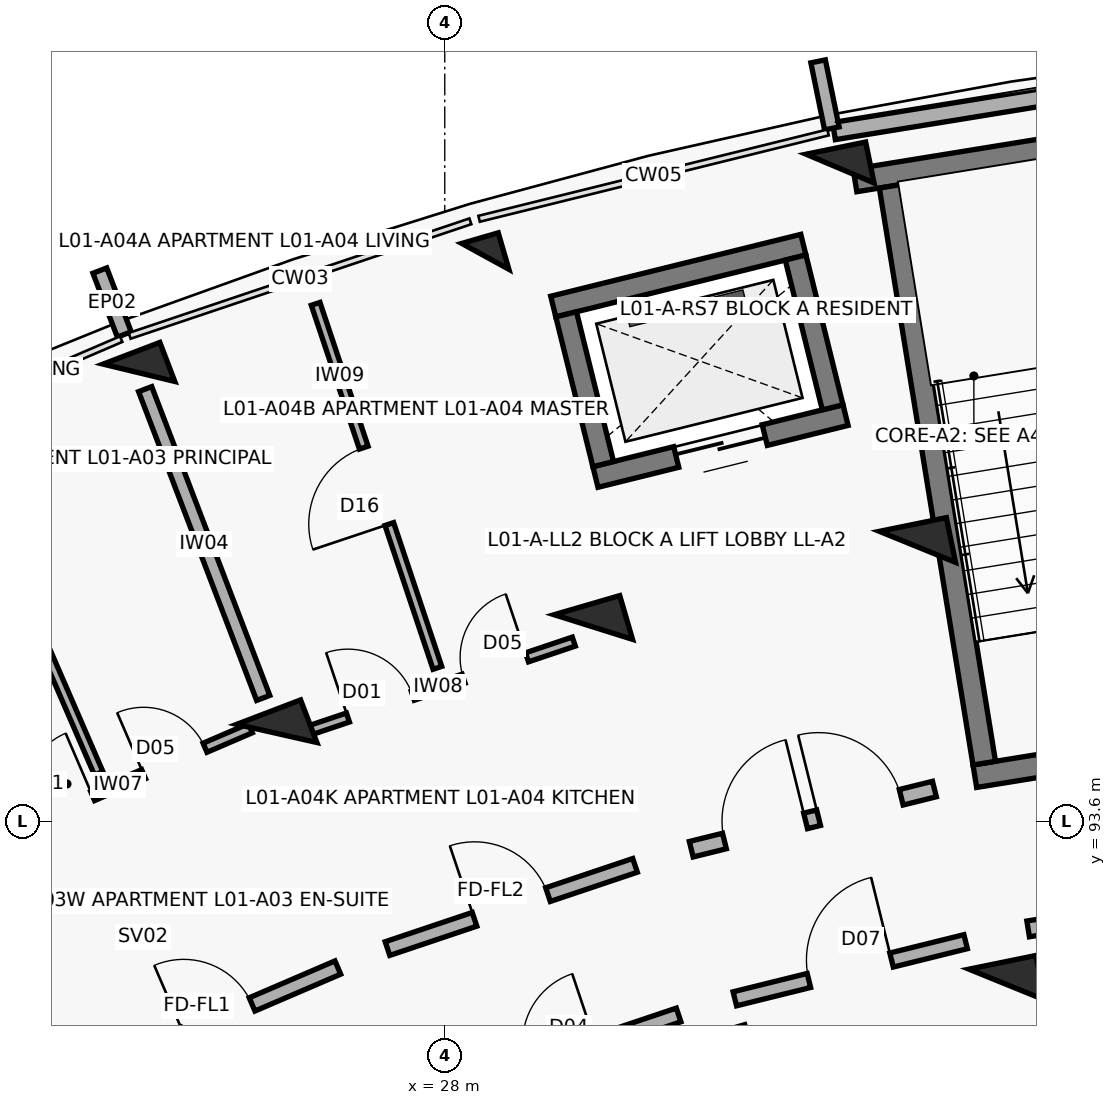
"""IFC4 building model, lengths in metres.
Left out: names, types, materials, properties, quantities, classifications, styles, units other than length and angle.
Written with IfcOpenShell. Run it as: python <this file> out.ifc"""

import sys

from ifc_helpers import new_model, si_unit, direction, frame, frame_2d, origin, origin_2d, place, context, subcontext, project, spatial, rectangle, extrude, element, fill, save


model = new_model("IFC4")
c1 = context("Model", 3, precision=1e-05, world=origin(), true_north=direction((0.0, 1.0)))
c2 = subcontext(c1, "Body", "Model", "MODEL_VIEW")
j1 = project(units=[si_unit("LENGTHUNIT", "METRE"), si_unit("PLANEANGLEUNIT", "RADIAN")], contexts=[c1])
p1 = place(None, origin())
s1 = spatial("IfcSite", under=j1, at=p1, CompositionType="ELEMENT")
p2 = place(p1, origin())
s2 = spatial("IfcBuilding", under=s1, at=p2, CompositionType="ELEMENT")
p3 = place(p2, frame((0.0, 0.0, 4.5)))
s3 = spatial("IfcBuildingStorey", under=s2, at=p3, CompositionType="ELEMENT", Elevation=4.5)
p4 = place(p3, frame((25.79, 94.753, 0.0), z_axis=(0.0, 0.0, 1.0), x_axis=(-0.357064076459, 0.934079892355, 0.0)))
e1 = element("IfcColumn", 1, at=p4, inside=s3, PredefinedType="COLUMN", context=c2, shape_type="SweptSolid", body=[
    extrude(rectangle(XDim=0.6, YDim=0.9, at=origin_2d()), origin(), (0.0, 0.0, 1.0), 3.6),
])
p5 = place(p3, frame((23.976, 99.499, 0.0), z_axis=(0.0, 0.0, 1.0), x_axis=(-0.357064076459, 0.934079892355, 0.0)))
e2 = element("IfcColumn", 2, at=p5, inside=s3, PredefinedType="COLUMN", context=c2, shape_type="SweptSolid", body=[
    extrude(rectangle(XDim=0.55, YDim=0.8, at=origin_2d()), origin(), (0.0, 0.0, 1.0), 3.6),
])
p6 = place(p3, frame((29.954, 96.153, 0.0), z_axis=(0.0, 0.0, 1.0), x_axis=(-0.27966144946, 0.96009867914, 0.0)))
e3 = element("IfcColumn", 3, at=p6, inside=s3, PredefinedType="COLUMN", context=c2, shape_type="SweptSolid", body=[
    extrude(rectangle(XDim=0.6, YDim=0.9, at=origin_2d()), origin(), (0.0, 0.0, 1.0), 3.6),
])
p7 = place(p3, frame((28.533, 101.031, 0.0), z_axis=(0.0, 0.0, 1.0), x_axis=(-0.27966144946, 0.96009867914, 0.0)))
e4 = element("IfcColumn", 4, at=p7, inside=s3, PredefinedType="COLUMN", context=c2, shape_type="SweptSolid", body=[
    extrude(rectangle(XDim=0.5, YDim=0.5, at=origin_2d()), origin(), (0.0, 0.0, 1.0), 3.6),
])
for number, where, z_axis, x_axis in (
    (5, (35.397, 91.448, 0.0), (0.0, 0.0, 1.0), (-0.2, 0.98, 0.0)),
    (6, (34.219, 97.209, 0.0), (0.0, 0.0, 1.0), (-0.2, 0.98, 0.0)),
):
    element("IfcColumn", number, at=place(p3, frame(where, z_axis=z_axis, x_axis=x_axis)), inside=s3, PredefinedType="COLUMN", context=c2, shape_type="SweptSolid", body=[
        extrude(rectangle(XDim=0.6, YDim=0.9, at=origin_2d()), origin(), (0.0, 0.0, 1.0), 3.6),
    ])
p8 = place(p3, frame((33.201, 102.186, 0.0), z_axis=(0.0, 0.0, 1.0), x_axis=(-0.200393999665, 0.979715389742, 0.0)))
e7 = element("IfcColumn", 7, at=p8, inside=s3, PredefinedType="COLUMN", context=c2, shape_type="SweptSolid", body=[
    extrude(rectangle(XDim=0.55, YDim=0.8, at=origin_2d()), origin(), (0.0, 0.0, 1.0), 3.6),
])
p9 = place(p3, frame((23.783, 100.003, 0.0), z_axis=(0.0, 0.0, 1.0), x_axis=(-0.356942580168, 0.934126326823, 0.0)))
e8 = element("IfcWall", 8, at=p9, inside=s3, PredefinedType="PARAPET", context=c2, shape_type="SweptSolid", body=[
    extrude(rectangle(XDim=0.9, YDim=0.195, at=frame_2d((0.45, 0.0))), origin(), (0.0, 0.0, 1.0), 2.6),
])
p10 = place(p3, frame((33.12, 102.679, 0.0), z_axis=(0.0, 0.0, 1.0), x_axis=(0.987080750493, 0.160223568819, 0.0)))
e9 = element("IfcWall", 9, at=p10, inside=s3, PredefinedType="SOLIDWALL", context=c2, shape_type="SweptSolid", body=[
    extrude(rectangle(XDim=4.809, YDim=0.228, at=frame_2d((2.404, 0.0))), origin(), (0.0, 0.0, 1.0), 2.6),
])
p11 = place(p3, frame((33.093, 102.715, 0.0), z_axis=(0.0, 0.0, 1.0), x_axis=(-0.200183211319, 0.979758481416, 0.0)))
e10 = element("IfcWall", 10, at=p11, inside=s3, PredefinedType="PARAPET", context=c2, shape_type="SweptSolid", body=[
    extrude(rectangle(XDim=0.9, YDim=0.195, at=frame_2d((0.45, 0.0))), origin(), (0.0, 0.0, 1.0), 2.6),
])
p12 = place(p3, frame((38.794, 94.811, 0.0), z_axis=(0.0, 0.0, 1.0), x_axis=(-0.987077443397, -0.160243941341, 0.0)))
e11 = element("IfcWall", 11, at=p12, inside=s3, PredefinedType="SHEAR", context=c2, shape_type="SweptSolid", body=[
    extrude(rectangle(XDim=3.87, YDim=0.3, at=frame_2d((1.935, 0.0))), origin(), (0.0, 0.0, 1.0), 3.6),
])
p13 = place(p12, frame((1.435, 0.0, 0.0)))
e12 = element("IfcOpeningElement", 12, at=p13, cuts=e11, PredefinedType="OPENING", context=c2, shape_type="SweptSolid", body=[
    extrude(rectangle(XDim=1.0, YDim=2.15, at=frame_2d((0.5, 1.075))), frame((0.0, 0.16, 0.0), z_axis=(0.0, -1.0, 0.0), x_axis=(1.0, 0.0, 0.0)), (0.0, 0.0, 1.0), 0.32),
])
p14 = place(p3, frame((37.81, 102.745, 0.0), z_axis=(0.0, 0.0, 1.0), x_axis=(-0.987084710126, -0.160199173019, 0.0)))
e13 = element("IfcWall", 13, at=p14, inside=s3, PredefinedType="SHEAR", context=c2, shape_type="SweptSolid", body=[
    extrude(rectangle(XDim=4.47, YDim=0.3, at=frame_2d((2.235, 0.0))), origin(), (0.0, 0.0, 1.0), 3.6),
])
p15 = place(p3, frame((35.098, 94.363, 0.0), z_axis=(0.0, 0.0, 1.0), x_axis=(-0.160227496777, 0.987080112897, 0.0)))
e14 = element("IfcWall", 14, at=p15, inside=s3, PredefinedType="SHEAR", context=c2, shape_type="SweptSolid", body=[
    extrude(rectangle(XDim=7.69, YDim=0.3, at=frame_2d((3.845, 0.0))), origin(), (0.0, 0.0, 1.0), 3.6),
])
p16 = place(p3, frame((33.273, 98.942, 0.0), z_axis=(0.0, 0.0, 1.0), x_axis=(-0.970707542441, -0.240264160972, 0.0)))
e15 = element("IfcWall", 15, at=p16, inside=s3, PredefinedType="SHEAR", context=c2, shape_type="SweptSolid", body=[
    extrude(rectangle(XDim=3.39, YDim=0.28, at=frame_2d((1.695, 0.0))), origin(), (0.0, 0.0, 1.0), 3.6),
])
p17 = place(p16, frame((1.095, 0.0, 0.0)))
e16 = element("IfcOpeningElement", 16, at=p17, cuts=e15, PredefinedType="OPENING", context=c2, shape_type="SweptSolid", body=[
    extrude(rectangle(XDim=1.2, YDim=2.15, at=frame_2d((0.6, 1.075))), frame((0.0, 0.15, 0.0), z_axis=(0.0, -1.0, 0.0), x_axis=(1.0, 0.0, 0.0)), (0.0, 0.0, 1.0), 0.3),
])
p18 = place(p3, frame((32.718, 101.185, 0.0), z_axis=(0.0, 0.0, 1.0), x_axis=(-0.970711699588, -0.240247364777, 0.0)))
e17 = element("IfcWall", 17, at=p18, inside=s3, PredefinedType="SHEAR", context=c2, shape_type="SweptSolid", body=[
    extrude(rectangle(XDim=3.39, YDim=0.28, at=frame_2d((1.695, 0.0))), origin(), (0.0, 0.0, 1.0), 3.6),
])
p19 = place(p3, frame((33.104, 99.044, 0.0), z_axis=(0.0, 0.0, 1.0), x_axis=(-0.240186044774, 0.970726873995, 0.0)))
e18 = element("IfcWall", 18, at=p19, inside=s3, PredefinedType="SHEAR", context=c2, shape_type="SweptSolid", body=[
    extrude(rectangle(XDim=2.03, YDim=0.28, at=frame_2d((1.015, 0.0))), origin(), (0.0, 0.0, 1.0), 3.6),
])
p20 = place(p3, frame((30.085, 98.297, 0.0), z_axis=(0.0, 0.0, 1.0), x_axis=(-0.2402993748, 0.970698825832, 0.0)))
e19 = element("IfcWall", 19, at=p20, inside=s3, PredefinedType="SHEAR", context=c2, shape_type="SweptSolid", body=[
    extrude(rectangle(XDim=2.03, YDim=0.28, at=frame_2d((1.015, 0.0))), origin(), (0.0, 0.0, 1.0), 3.6),
])
p21 = place(p3, frame((23.437, 90.316, 0.0), z_axis=(0.0, 0.0, 1.0), x_axis=(0.918718172399, 0.394913813008, 0.0)))
e20 = element("IfcWall", 20, at=p21, inside=s3, PredefinedType="SOLIDWALL", context=c2, shape_type="SweptSolid", body=[
    extrude(rectangle(XDim=3.436, YDim=0.19, at=frame_2d((1.718, 0.0))), origin(), (0.0, 0.0, 1.0), 2.58),
])
p22 = place(p21, frame((1.228, 0.0, 0.0)))
e21 = element("IfcOpeningElement", 21, at=p22, cuts=e20, PredefinedType="OPENING", context=c2, shape_type="SweptSolid", body=[
    extrude(rectangle(XDim=0.98, YDim=2.15, at=frame_2d((0.49, 1.075))), frame((0.0, 0.105, 0.0), z_axis=(0.0, -1.0, 0.0), x_axis=(1.0, 0.0, 0.0)), (0.0, 0.0, 1.0), 0.21),
])
p23 = place(p3, frame((21.943, 93.317, 0.0), z_axis=(0.0, 0.0, 1.0), x_axis=(0.918726854017, 0.394893615684, 0.0)))
e22 = element("IfcWall", 22, at=p23, inside=s3, PredefinedType="PARTITIONING", context=c2, shape_type="SweptSolid", body=[
    extrude(rectangle(XDim=3.81, YDim=0.13, at=frame_2d((1.905, 0.0))), origin(), (0.0, 0.0, 1.0), 2.58),
])
p24 = place(p23, frame((0.65, 0.0, 0.0)))
e23 = element("IfcOpeningElement", 23, at=p24, cuts=e22, PredefinedType="OPENING", context=c2, shape_type="SweptSolid", body=[
    extrude(rectangle(XDim=0.9, YDim=2.1, at=frame_2d((0.45, 1.05))), frame((0.0, 0.075, 0.0), z_axis=(0.0, -1.0, 0.0), x_axis=(1.0, 0.0, 0.0)), (0.0, 0.0, 1.0), 0.15),
])
p25 = place(p23, frame((2.28, 0.0, 0.0)))
e24 = element("IfcOpeningElement", 24, at=p25, cuts=e22, PredefinedType="OPENING", context=c2, shape_type="SweptSolid", body=[
    extrude(rectangle(XDim=0.88, YDim=2.1, at=frame_2d((0.44, 1.05))), frame((0.0, 0.075, 0.0), z_axis=(0.0, -1.0, 0.0), x_axis=(1.0, 0.0, 0.0)), (0.0, 0.0, 1.0), 0.15),
])
p26 = place(p3, frame((23.446, 94.23, 0.0), z_axis=(0.0, 0.0, 1.0), x_axis=(-0.3976752315, 0.917526244993, 0.0)))
e25 = element("IfcWall", 25, at=p26, inside=s3, PredefinedType="PARTITIONING", context=c2, shape_type="SweptSolid", body=[
    extrude(rectangle(XDim=4.75, YDim=0.12, at=frame_2d((2.375, 0.0))), origin(), (0.0, 0.0, 1.0), 2.58),
])
p27 = place(p26, frame((1.87, 0.0, 0.0)))
e26 = element("IfcOpeningElement", 26, at=p27, cuts=e25, PredefinedType="OPENING", context=c2, shape_type="SweptSolid", body=[
    extrude(rectangle(XDim=1.01, YDim=2.1, at=frame_2d((0.505, 1.05))), frame((0.0, 0.07, 0.0), z_axis=(0.0, -1.0, 0.0), x_axis=(1.0, 0.0, 0.0)), (0.0, 0.0, 1.0), 0.14),
])
p28 = place(p3, frame((27.247, 91.923, 0.0), z_axis=(0.0, 0.0, 1.0), x_axis=(0.947863007629, 0.318678080151, 0.0)))
e27 = element("IfcWall", 27, at=p28, inside=s3, PredefinedType="SOLIDWALL", context=c2, shape_type="SweptSolid", body=[
    extrude(rectangle(XDim=3.436, YDim=0.19, at=frame_2d((1.718, 0.0))), origin(), (0.0, 0.0, 1.0), 2.58),
])
p29 = place(p28, frame((1.208, 0.0, 0.0)))
e28 = element("IfcOpeningElement", 28, at=p29, cuts=e27, PredefinedType="OPENING", context=c2, shape_type="SweptSolid", body=[
    extrude(rectangle(XDim=1.02, YDim=2.15, at=frame_2d((0.51, 1.075))), frame((0.0, 0.105, 0.0), z_axis=(0.0, -1.0, 0.0), x_axis=(1.0, 0.0, 0.0)), (0.0, 0.0, 1.0), 0.21),
])
p30 = place(p3, frame((27.979, 90.008, 0.0), z_axis=(0.0, 0.0, 1.0), x_axis=(0.94787351033, 0.318646839643, 0.0)))
e29 = element("IfcWall", 29, at=p30, inside=s3, PredefinedType="SOLIDWALL", context=c2, shape_type="SweptSolid", body=[
    extrude(rectangle(XDim=3.269, YDim=0.19, at=frame_2d((1.634, 0.0))), origin(), (0.0, 0.0, 1.0), 2.58),
])
p31 = place(p30, frame((1.154, 0.0, 0.0)))
e30 = element("IfcOpeningElement", 30, at=p31, cuts=e29, PredefinedType="OPENING", context=c2, shape_type="SweptSolid", body=[
    extrude(rectangle(XDim=0.96, YDim=2.1, at=frame_2d((0.48, 1.05))), frame((0.0, 0.105, 0.0), z_axis=(0.0, -1.0, 0.0), x_axis=(1.0, 0.0, 0.0)), (0.0, 0.0, 1.0), 0.21),
])
p32 = place(p3, frame((26.11, 94.756, 0.0), z_axis=(0.0, 0.0, 1.0), x_axis=(0.947873924847, 0.318645606584, 0.0)))
e31 = element("IfcWall", 31, at=p32, inside=s3, PredefinedType="PARTITIONING", context=c2, shape_type="SweptSolid", body=[
    extrude(rectangle(XDim=3.785, YDim=0.125, at=frame_2d((1.893, 0.0))), origin(), (0.0, 0.0, 1.0), 2.58),
])
p33 = place(p32, frame((0.65, 0.0, 0.0)))
e32 = element("IfcOpeningElement", 32, at=p33, cuts=e31, PredefinedType="OPENING", context=c2, shape_type="SweptSolid", body=[
    extrude(rectangle(XDim=0.9, YDim=2.1, at=frame_2d((0.45, 1.05))), frame((0.0, 0.073, 0.0), z_axis=(0.0, -1.0, 0.0), x_axis=(1.0, 0.0, 0.0)), (0.0, 0.0, 1.0), 0.145),
])
p34 = place(p32, frame((2.255, 0.0, 0.0)))
e33 = element("IfcOpeningElement", 33, at=p34, cuts=e31, PredefinedType="OPENING", context=c2, shape_type="SweptSolid", body=[
    extrude(rectangle(XDim=0.88, YDim=2.1, at=frame_2d((0.44, 1.05))), frame((0.0, 0.073, 0.0), z_axis=(0.0, -1.0, 0.0), x_axis=(1.0, 0.0, 0.0)), (0.0, 0.0, 1.0), 0.145),
])
p35 = place(p3, frame((27.903, 95.616, 0.0), z_axis=(0.0, 0.0, 1.0), x_axis=(-0.31722829501, 0.948349201953, 0.0)))
e34 = element("IfcWall", 34, at=p35, inside=s3, PredefinedType="PARTITIONING", context=c2, shape_type="SweptSolid", body=[
    extrude(rectangle(XDim=5.05, YDim=0.12, at=frame_2d((2.525, 0.0))), origin(), (0.0, 0.0, 1.0), 2.58),
])
p36 = place(p35, frame((1.995, 0.0, 0.0)))
e35 = element("IfcOpeningElement", 35, at=p36, cuts=e34, PredefinedType="OPENING", context=c2, shape_type="SweptSolid", body=[
    extrude(rectangle(XDim=1.06, YDim=2.1, at=frame_2d((0.53, 1.05))), frame((0.0, 0.07, 0.0), z_axis=(0.0, -1.0, 0.0), x_axis=(1.0, 0.0, 0.0)), (0.0, 0.0, 1.0), 0.14),
])
p37 = place(p3, frame((25.611, 95.22, 0.0), z_axis=(0.0, 0.0, 1.0), x_axis=(-0.357064016205, 0.934079915388, 0.0)))
e36 = element("IfcWall", 36, at=p37, inside=s3, PredefinedType="SOLIDWALL", context=c2, shape_type="SweptSolid", body=[
    extrude(rectangle(XDim=4.35, YDim=0.185, at=frame_2d((2.175, 0.0))), origin(), (0.0, 0.0, 1.0), 2.58),
])
p38 = place(p3, frame((31.243, 93.23, 0.0), z_axis=(0.0, 0.0, 1.0), x_axis=(0.970719238682, 0.240216901263, 0.0)))
e37 = element("IfcWall", 37, at=p38, inside=s3, PredefinedType="SOLIDWALL", context=c2, shape_type="SweptSolid", body=[
    extrude(rectangle(XDim=3.296, YDim=0.21, at=frame_2d((1.648, 0.0))), origin(), (0.0, 0.0, 1.0), 2.58),
])
p39 = place(p38, frame((0.45, 0.0, 0.0)))
e38 = element("IfcOpeningElement", 38, at=p39, cuts=e37, PredefinedType="OPENING", context=c2, shape_type="SweptSolid", body=[
    extrude(rectangle(XDim=1.1, YDim=2.15, at=frame_2d((0.55, 1.075))), frame((0.0, 0.115, 0.0), z_axis=(0.0, -1.0, 0.0), x_axis=(1.0, 0.0, 0.0)), (0.0, 0.0, 1.0), 0.23),
])
p40 = place(p38, frame((1.726, 0.0, 0.0)))
e39 = element("IfcOpeningElement", 39, at=p40, cuts=e37, PredefinedType="OPENING", context=c2, shape_type="SweptSolid", body=[
    extrude(rectangle(XDim=1.12, YDim=2.15, at=frame_2d((0.56, 1.075))), frame((0.0, 0.115, 0.0), z_axis=(0.0, -1.0, 0.0), x_axis=(1.0, 0.0, 0.0)), (0.0, 0.0, 1.0), 0.23),
])
p41 = place(p3, frame((31.816, 91.262, 0.0), z_axis=(0.0, 0.0, 1.0), x_axis=(0.970727194092, 0.240184751078, 0.0)))
e40 = element("IfcWall", 40, at=p41, inside=s3, PredefinedType="SOLIDWALL", context=c2, shape_type="SweptSolid", body=[
    extrude(rectangle(XDim=3.129, YDim=0.19, at=frame_2d((1.564, 0.0))), origin(), (0.0, 0.0, 1.0), 2.58),
])
p42 = place(p41, frame((1.004, 0.0, 0.0)))
e41 = element("IfcOpeningElement", 41, at=p42, cuts=e40, PredefinedType="OPENING", context=c2, shape_type="SweptSolid", body=[
    extrude(rectangle(XDim=1.12, YDim=2.15, at=frame_2d((0.56, 1.075))), frame((0.0, 0.105, 0.0), z_axis=(0.0, -1.0, 0.0), x_axis=(1.0, 0.0, 0.0)), (0.0, 0.0, 1.0), 0.21),
])
p43 = place(p3, frame((35.676, 92.181, 0.0), z_axis=(0.0, 0.0, 1.0), x_axis=(0.98707079686, 0.160284877599, 0.0)))
e42 = element("IfcWall", 42, at=p43, inside=s3, PredefinedType="SOLIDWALL", context=c2, shape_type="SweptSolid", body=[
    extrude(rectangle(XDim=3.129, YDim=0.21, at=frame_2d((1.564, 0.0))), origin(), (0.0, 0.0, 1.0), 2.58),
])
p44 = place(p43, frame((1.014, 0.0, 0.0)))
e43 = element("IfcOpeningElement", 43, at=p44, cuts=e42, PredefinedType="OPENING", context=c2, shape_type="SweptSolid", body=[
    extrude(rectangle(XDim=1.1, YDim=2.15, at=frame_2d((0.55, 1.075))), frame((0.0, 0.115, 0.0), z_axis=(0.0, -1.0, 0.0), x_axis=(1.0, 0.0, 0.0)), (0.0, 0.0, 1.0), 0.23),
])
p45 = place(p17, origin())
e44 = element("IfcDoor", 44, at=p45, inside=s3, OperationType="DOUBLE_DOOR_SLIDING", PredefinedType="DOOR", context=c2, shape_type="SweptSolid", body=[
    extrude(rectangle(XDim=1.2, YDim=2.15, at=frame_2d((0.6, 1.075))), frame((0.0, 0.025, 0.0), z_axis=(0.0, -1.0, 0.0), x_axis=(1.0, 0.0, 0.0)), (0.0, 0.0, 1.0), 0.05),
])
fill(e16, e44)
p46 = place(p22, origin())
e45 = element("IfcDoor", 45, at=p46, inside=s3, OperationType="SINGLE_SWING_LEFT", PredefinedType="DOOR", context=c2, shape_type="SweptSolid", body=[
    extrude(rectangle(XDim=0.98, YDim=2.15, at=frame_2d((0.49, 1.075))), frame((0.0, 0.025, 0.0), z_axis=(0.0, -1.0, 0.0), x_axis=(1.0, 0.0, 0.0)), (0.0, 0.0, 1.0), 0.05),
])
fill(e21, e45)
p47 = place(p24, origin())
e46 = element("IfcDoor", 46, at=p47, inside=s3, OperationType="SINGLE_SWING_RIGHT", PredefinedType="DOOR", context=c2, shape_type="SweptSolid", body=[
    extrude(rectangle(XDim=0.9, YDim=2.1, at=frame_2d((0.45, 1.05))), frame((0.0, 0.025, 0.0), z_axis=(0.0, -1.0, 0.0), x_axis=(1.0, 0.0, 0.0)), (0.0, 0.0, 1.0), 0.05),
])
fill(e23, e46)
p48 = place(p25, origin())
e47 = element("IfcDoor", 47, at=p48, inside=s3, OperationType="SINGLE_SWING_LEFT", PredefinedType="DOOR", context=c2, shape_type="SweptSolid", body=[
    extrude(rectangle(XDim=0.88, YDim=2.1, at=frame_2d((0.44, 1.05))), frame((0.0, 0.025, 0.0), z_axis=(0.0, -1.0, 0.0), x_axis=(1.0, 0.0, 0.0)), (0.0, 0.0, 1.0), 0.05),
])
fill(e24, e47)
p49 = place(p29, origin())
e48 = element("IfcDoor", 48, at=p49, inside=s3, OperationType="SINGLE_SWING_LEFT", PredefinedType="DOOR", context=c2, shape_type="SweptSolid", body=[
    extrude(rectangle(XDim=1.02, YDim=2.15, at=frame_2d((0.51, 1.075))), frame((0.0, 0.025, 0.0), z_axis=(0.0, -1.0, 0.0), x_axis=(1.0, 0.0, 0.0)), (0.0, 0.0, 1.0), 0.05),
])
fill(e28, e48)
p50 = place(p33, origin())
e49 = element("IfcDoor", 49, at=p50, inside=s3, OperationType="SINGLE_SWING_LEFT", PredefinedType="DOOR", context=c2, shape_type="SweptSolid", body=[
    extrude(rectangle(XDim=0.9, YDim=2.1, at=frame_2d((0.45, 1.05))), frame((0.0, 0.025, 0.0), z_axis=(0.0, -1.0, 0.0), x_axis=(1.0, 0.0, 0.0)), (0.0, 0.0, 1.0), 0.05),
])
fill(e32, e49)
p51 = place(p34, origin())
e50 = element("IfcDoor", 50, at=p51, inside=s3, OperationType="SINGLE_SWING_RIGHT", PredefinedType="DOOR", context=c2, shape_type="SweptSolid", body=[
    extrude(rectangle(XDim=0.88, YDim=2.1, at=frame_2d((0.44, 1.05))), frame((0.0, 0.025, 0.0), z_axis=(0.0, -1.0, 0.0), x_axis=(1.0, 0.0, 0.0)), (0.0, 0.0, 1.0), 0.05),
])
fill(e33, e50)
p52 = place(p36, origin())
e51 = element("IfcDoor", 51, at=p52, inside=s3, OperationType="SINGLE_SWING_LEFT", PredefinedType="DOOR", context=c2, shape_type="SweptSolid", body=[
    extrude(rectangle(XDim=1.06, YDim=2.1, at=frame_2d((0.53, 1.05))), frame((0.0, 0.025, 0.0), z_axis=(0.0, -1.0, 0.0), x_axis=(1.0, 0.0, 0.0)), (0.0, 0.0, 1.0), 0.05),
])
fill(e35, e51)
p53 = place(p39, origin())
e52 = element("IfcDoor", 52, at=p53, inside=s3, OperationType="SINGLE_SWING_RIGHT", PredefinedType="DOOR", context=c2, shape_type="SweptSolid", body=[
    extrude(rectangle(XDim=1.1, YDim=2.15, at=frame_2d((0.55, 1.075))), frame((0.0, 0.025, 0.0), z_axis=(0.0, -1.0, 0.0), x_axis=(1.0, 0.0, 0.0)), (0.0, 0.0, 1.0), 0.05),
])
fill(e38, e52)
p54 = place(p40, origin())
e53 = element("IfcDoor", 53, at=p54, inside=s3, OperationType="SINGLE_SWING_LEFT", PredefinedType="DOOR", context=c2, shape_type="SweptSolid", body=[
    extrude(rectangle(XDim=1.12, YDim=2.15, at=frame_2d((0.56, 1.075))), frame((0.0, 0.025, 0.0), z_axis=(0.0, -1.0, 0.0), x_axis=(1.0, 0.0, 0.0)), (0.0, 0.0, 1.0), 0.05),
])
fill(e39, e53)
p55 = place(p42, origin())
e54 = element("IfcDoor", 54, at=p55, inside=s3, OperationType="SINGLE_SWING_RIGHT", PredefinedType="DOOR", context=c2, shape_type="SweptSolid", body=[
    extrude(rectangle(XDim=1.12, YDim=2.15, at=frame_2d((0.56, 1.075))), frame((0.0, 0.025, 0.0), z_axis=(0.0, -1.0, 0.0), x_axis=(1.0, 0.0, 0.0)), (0.0, 0.0, 1.0), 0.05),
])
fill(e41, e54)
save(model, sys.argv[1])
